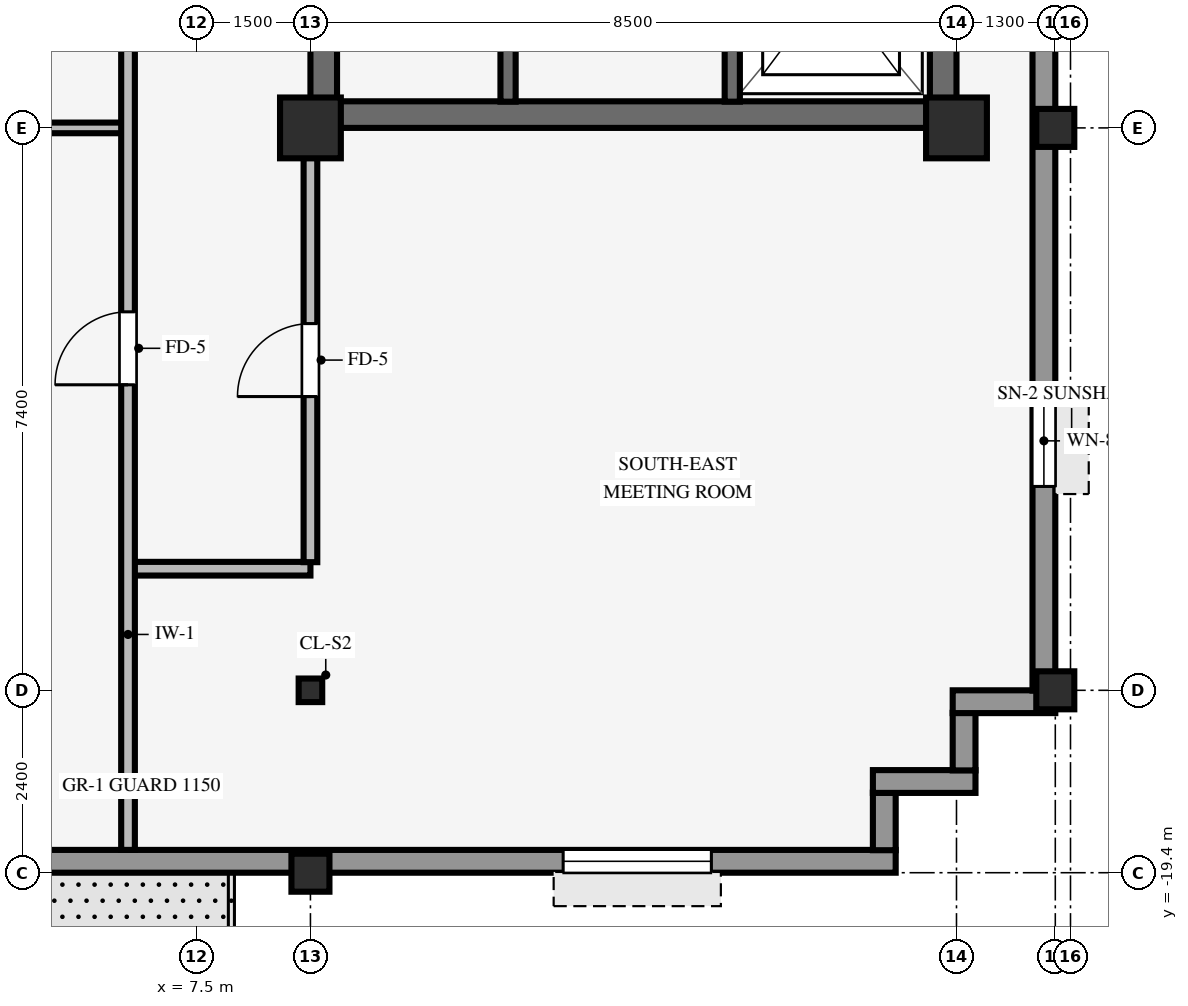
"""IFC4 building model, lengths in metres.
Left out: names, types, materials, properties, quantities, classifications, styles, units other than length and angle.
Written with IfcOpenShell. Run it as: python <this file> out.ifc"""

import sys

from ifc_helpers import new_model, si_unit, direction, frame, frame_2d, origin, origin_2d, place, context, subcontext, project, spatial, rectangle, hollow_rectangle, i_section, extrude, source, transform, mapped, element, fill, save


model = new_model("IFC4")
c1 = context("Model", 3, precision=1e-05, world=origin(), true_north=direction((0.0, 1.0)))
c2 = subcontext(c1, "Body", "Model", "MODEL_VIEW")
j1 = project(units=[si_unit("LENGTHUNIT", "METRE"), si_unit("PLANEANGLEUNIT", "RADIAN")], contexts=[c1])
p1 = place(None, origin())
s1 = spatial("IfcSite", under=j1, at=p1, CompositionType="ELEMENT")
p2 = place(p1, origin())
s2 = spatial("IfcBuilding", under=s1, at=p2, CompositionType="ELEMENT")
p3 = place(p2, frame((0.0, 0.0, 265.25)))
s3 = spatial("IfcBuildingStorey", under=s2, at=p3, CompositionType="ELEMENT", Elevation=265.25)
p4 = place(p3, frame((9.0, -9.425, 0.0), z_axis=(0.0, 0.0, 1.0), x_axis=(1.0, 0.0, 0.0)))
e1 = element("IfcWall", 1, at=p4, inside=s3, PredefinedType="SHEAR", context=c2, shape_type="SweptSolid", body=[
    extrude(rectangle(XDim=8.5, YDim=0.35, at=frame_2d((4.25, 0.0))), origin(), (0.0, 0.0, 1.0), 3.37),
])
p5 = place(p3, frame((9.175, -9.255, 0.0), z_axis=(0.0, 0.0, 1.0), x_axis=(0.0, 1.0, 0.0)))
e2 = element("IfcWall", 2, at=p5, inside=s3, PredefinedType="SHEAR", context=c2, shape_type="SweptSolid", body=[
    extrude(rectangle(XDim=18.51, YDim=0.35, at=frame_2d((9.255, 0.0))), origin(), (0.0, 0.0, 1.0), 3.37),
])
p6 = place(p5, frame((8.655, 0.0, 0.0)))
e3 = element("IfcOpeningElement", 3, at=p6, cuts=e2, PredefinedType="OPENING", context=c2, shape_type="SweptSolid", body=[
    extrude(rectangle(XDim=1.2, YDim=2.15, at=frame_2d((0.6, 1.075))), frame((0.0, 0.185, 0.0), z_axis=(0.0, -1.0, 0.0), x_axis=(1.0, 0.0, 0.0)), (0.0, 0.0, 1.0), 0.37),
])
p7 = place(p3, frame((17.325, -9.255, 0.0), z_axis=(0.0, 0.0, 1.0), x_axis=(0.0, 1.0, 0.0)))
e4 = element("IfcWall", 4, at=p7, inside=s3, PredefinedType="SHEAR", context=c2, shape_type="SweptSolid", body=[
    extrude(rectangle(XDim=18.51, YDim=0.35, at=frame_2d((9.255, 0.0))), origin(), (0.0, 0.0, 1.0), 3.37),
])
for number, where, z_axis, x_axis in (
    (5, (9.0, -9.6, 0.0), (0.0, 0.0, 1.0), (1.0, 0.0, 0.0)),
    (6, (17.5, -9.6, 0.0), (0.0, 0.0, 1.0), (1.0, 0.0, 0.0)),
):
    element("IfcColumn", number, at=place(p3, frame(where, z_axis=z_axis, x_axis=x_axis)), inside=s3, PredefinedType="COLUMN", context=c2, shape_type="SweptSolid", body=[
        extrude(rectangle(XDim=0.8, YDim=0.8, at=origin_2d()), origin(), (0.0, 0.0, 1.0), 3.37),
    ])
for number, where, z_axis, x_axis in (
    (7, (18.8, -17.0, 0.0), (0.0, 0.0, 1.0), (1.0, 0.0, 0.0)),
    (8, (18.8, -9.6, 0.0), (0.0, 0.0, 1.0), (1.0, 0.0, 0.0)),
    (9, (9.0, -19.4, 0.0), (0.0, 0.0, 1.0), (1.0, 0.0, 0.0)),
):
    element("IfcColumn", number, at=place(p3, frame(where, z_axis=z_axis, x_axis=x_axis)), inside=s3, PredefinedType="COLUMN", context=c2, shape_type="SweptSolid", body=[
        extrude(hollow_rectangle(XDim=0.5, YDim=0.5, WallThickness=0.032, InnerFilletRadius=0.032, OuterFilletRadius=0.064, at=origin_2d()), origin(), (0.0, 0.0, 1.0), 3.37),
    ])
p8 = place(p3, frame((9.0, -17.0, 0.0), z_axis=(0.0, 0.0, 1.0), x_axis=(1.0, 0.0, 0.0)))
e10 = element("IfcColumn", 10, at=p8, inside=s3, PredefinedType="COLUMN", context=c2, shape_type="SweptSolid", body=[
    extrude(i_section(OverallWidth=0.31, OverallDepth=0.31, WebThickness=0.015, FlangeThickness=0.015, FilletRadius=0.015, at=origin_2d()), origin(), (0.0, 0.0, 1.0), 3.37),
])
p9 = place(p3, frame((-18.9, -19.25, 0.0), z_axis=(0.0, 0.0, 1.0), x_axis=(1.0, 0.0, 0.0)))
e11 = element("IfcWall", 11, at=p9, inside=s3, PredefinedType="STANDARD", context=c2, shape_type="SweptSolid", body=[
    extrude(rectangle(XDim=35.6, YDim=0.3, at=frame_2d((17.8, 0.0))), origin(), (0.0, 0.0, 1.0), 2.705),
])
p10 = place(p9, frame((24.15, 0.0, 0.0), z_axis=(0.0, 0.0, 1.0), x_axis=(-1.0, 0.0, 0.0)))
e12 = element("IfcOpeningElement", 12, at=p10, cuts=e11, PredefinedType="OPENING", context=c2, shape_type="SweptSolid", body=[
    extrude(rectangle(XDim=1.05, YDim=2.1, at=frame_2d((0.525, 1.05))), frame((0.0, 0.16, 0.0), z_axis=(0.0, -1.0, 0.0), x_axis=(1.0, 0.0, 0.0)), (0.0, 0.0, 1.0), 0.32),
])
p11 = place(p9, frame((2.425, 0.0, 0.8)))
e13 = element("IfcOpeningElement", 13, at=p11, cuts=e11, PredefinedType="OPENING", context=c2, shape_type="SweptSolid", body=[
    extrude(rectangle(XDim=1.95, YDim=1.48, at=frame_2d((0.975, 0.74))), frame((0.0, 0.16, 0.0), z_axis=(0.0, -1.0, 0.0), x_axis=(1.0, 0.0, 0.0)), (0.0, 0.0, 1.0), 0.32),
])
p12 = place(p9, frame((7.225, 0.0, 0.8)))
e14 = element("IfcOpeningElement", 14, at=p12, cuts=e11, PredefinedType="OPENING", context=c2, shape_type="SweptSolid", body=[
    extrude(rectangle(XDim=1.95, YDim=1.48, at=frame_2d((0.975, 0.74))), frame((0.0, 0.16, 0.0), z_axis=(0.0, -1.0, 0.0), x_axis=(1.0, 0.0, 0.0)), (0.0, 0.0, 1.0), 0.32),
])
p13 = place(p9, frame((12.925, 0.0, 0.8)))
e15 = element("IfcOpeningElement", 15, at=p13, cuts=e11, PredefinedType="OPENING", context=c2, shape_type="SweptSolid", body=[
    extrude(rectangle(XDim=1.95, YDim=1.48, at=frame_2d((0.975, 0.74))), frame((0.0, 0.16, 0.0), z_axis=(0.0, -1.0, 0.0), x_axis=(1.0, 0.0, 0.0)), (0.0, 0.0, 1.0), 0.32),
])
p14 = place(p9, frame((15.475, 0.0, 0.8)))
e16 = element("IfcOpeningElement", 16, at=p14, cuts=e11, PredefinedType="OPENING", context=c2, shape_type="SweptSolid", body=[
    extrude(rectangle(XDim=1.95, YDim=1.48, at=frame_2d((0.975, 0.74))), frame((0.0, 0.16, 0.0), z_axis=(0.0, -1.0, 0.0), x_axis=(1.0, 0.0, 0.0)), (0.0, 0.0, 1.0), 0.32),
])
p15 = place(p9, frame((20.725, 0.0, 0.8)))
e17 = element("IfcOpeningElement", 17, at=p15, cuts=e11, PredefinedType="OPENING", context=c2, shape_type="SweptSolid", body=[
    extrude(rectangle(XDim=1.95, YDim=1.48, at=frame_2d((0.975, 0.74))), frame((0.0, 0.16, 0.0), z_axis=(0.0, -1.0, 0.0), x_axis=(1.0, 0.0, 0.0)), (0.0, 0.0, 1.0), 0.32),
])
p16 = place(p9, frame((31.225, 0.0, 0.8)))
e18 = element("IfcOpeningElement", 18, at=p16, cuts=e11, PredefinedType="OPENING", context=c2, shape_type="SweptSolid", body=[
    extrude(rectangle(XDim=1.95, YDim=1.48, at=frame_2d((0.975, 0.74))), frame((0.0, 0.16, 0.0), z_axis=(0.0, -1.0, 0.0), x_axis=(1.0, 0.0, 0.0)), (0.0, 0.0, 1.0), 0.32),
])
p17 = place(p3, frame((16.55, -19.104, 0.0), z_axis=(0.0, 0.0, 1.0), x_axis=(0.0, 1.0, 0.0)))
e19 = element("IfcWall", 19, at=p17, inside=s3, PredefinedType="STANDARD", context=c2, shape_type="SweptSolid", body=[
    extrude(rectangle(XDim=0.758, YDim=0.3, at=frame_2d((0.379, 0.0))), origin(), (0.0, 0.0, 1.0), 2.892),
])
p18 = place(p3, frame((16.4, -18.2, 0.0), z_axis=(0.0, 0.0, 1.0), x_axis=(1.0, 0.0, 0.0)))
e20 = element("IfcWall", 20, at=p18, inside=s3, PredefinedType="STANDARD", context=c2, shape_type="SweptSolid", body=[
    extrude(rectangle(XDim=1.35, YDim=0.3, at=frame_2d((0.675, 0.0))), origin(), (0.0, 0.0, 1.0), 2.892),
])
p19 = place(p3, frame((17.6, -18.054, 0.0), z_axis=(0.0, 0.0, 1.0), x_axis=(0.0, 1.0, 0.0)))
e21 = element("IfcWall", 21, at=p19, inside=s3, PredefinedType="STANDARD", context=c2, shape_type="SweptSolid", body=[
    extrude(rectangle(XDim=0.758, YDim=0.3, at=frame_2d((0.379, 0.0))), origin(), (0.0, 0.0, 1.0), 2.892),
])
p20 = place(p3, frame((17.45, -17.15, 0.0), z_axis=(0.0, 0.0, 1.0), x_axis=(1.0, 0.0, 0.0)))
e22 = element("IfcWall", 22, at=p20, inside=s3, PredefinedType="STANDARD", context=c2, shape_type="SweptSolid", body=[
    extrude(rectangle(XDim=1.35, YDim=0.3, at=frame_2d((0.675, 0.0))), origin(), (0.0, 0.0, 1.0), 2.892),
])
p21 = place(p3, frame((18.65, -17.004, 0.0), z_axis=(0.0, 0.0, 1.0), x_axis=(0.0, 1.0, 0.0)))
e23 = element("IfcWall", 23, at=p21, inside=s3, PredefinedType="STANDARD", context=c2, shape_type="SweptSolid", body=[
    extrude(rectangle(XDim=34.008, YDim=0.3, at=frame_2d((17.004, 0.0))), origin(), (0.0, 0.0, 1.0), 2.705),
])
p22 = place(p21, frame((2.686, 0.0, 0.8)))
e24 = element("IfcOpeningElement", 24, at=p22, cuts=e23, PredefinedType="OPENING", context=c2, shape_type="SweptSolid", body=[
    extrude(rectangle(XDim=1.2, YDim=1.48, at=frame_2d((0.6, 0.74))), frame((0.0, 0.16, 0.0), z_axis=(0.0, -1.0, 0.0), x_axis=(1.0, 0.0, 0.0)), (0.0, 0.0, 1.0), 0.32),
])
p23 = place(p21, frame((30.122, 0.0, 0.8)))
e25 = element("IfcOpeningElement", 25, at=p23, cuts=e23, PredefinedType="OPENING", context=c2, shape_type="SweptSolid", body=[
    extrude(rectangle(XDim=1.2, YDim=1.48, at=frame_2d((0.6, 0.74))), frame((0.0, 0.16, 0.0), z_axis=(0.0, -1.0, 0.0), x_axis=(1.0, 0.0, 0.0)), (0.0, 0.0, 1.0), 0.32),
])
p24 = place(p3, frame((14.55, -9.255, 0.0), z_axis=(0.0, 0.0, 1.0), x_axis=(0.0, 1.0, 0.0)))
e26 = element("IfcWall", 26, at=p24, inside=s3, PredefinedType="SHEAR", context=c2, shape_type="SweptSolid", body=[
    extrude(rectangle(XDim=10.16, YDim=0.2, at=frame_2d((5.08, 0.0))), origin(), (0.0, 0.0, 1.0), 3.37),
])
p25 = place(p24, frame((6.615, 0.0, 0.0)))
e27 = element("IfcOpeningElement", 27, at=p25, cuts=e26, PredefinedType="OPENING", context=c2, shape_type="SweptSolid", body=[
    extrude(rectangle(XDim=0.88, YDim=2.1, at=frame_2d((0.44, 1.05))), frame((0.0, 0.11, 0.0), z_axis=(0.0, -1.0, 0.0), x_axis=(1.0, 0.0, 0.0)), (0.0, 0.0, 1.0), 0.22),
])
p26 = place(p24, frame((0.98, 0.0, 0.0)))
e28 = element("IfcOpeningElement", 28, at=p26, cuts=e26, PredefinedType="OPENING", context=c2, shape_type="SweptSolid", body=[
    extrude(rectangle(XDim=1.15, YDim=2.15, at=frame_2d((0.575, 1.075))), frame((0.0, 0.11, 0.0), z_axis=(0.0, -1.0, 0.0), x_axis=(1.0, 0.0, 0.0)), (0.0, 0.0, 1.0), 0.22),
])
p27 = place(p3, frame((11.6, -9.255, 0.0), z_axis=(0.0, 0.0, 1.0), x_axis=(0.0, 1.0, 0.0)))
e29 = element("IfcWall", 29, at=p27, inside=s3, PredefinedType="SHEAR", context=c2, shape_type="SweptSolid", body=[
    extrude(rectangle(XDim=8.025, YDim=0.2, at=frame_2d((4.012, 0.0))), origin(), (0.0, 0.0, 1.0), 3.37),
])
p28 = place(p27, frame((5.615, 0.0, 0.0)))
e30 = element("IfcOpeningElement", 30, at=p28, cuts=e29, PredefinedType="OPENING", context=c2, shape_type="SweptSolid", body=[
    extrude(rectangle(XDim=0.88, YDim=2.1, at=frame_2d((0.44, 1.05))), frame((0.0, 0.11, 0.0), z_axis=(0.0, -1.0, 0.0), x_axis=(1.0, 0.0, 0.0)), (0.0, 0.0, 1.0), 0.22),
])
p29 = place(p3, frame((6.666, -15.4, 0.0), z_axis=(0.0, 0.0, 1.0), x_axis=(1.0, 0.0, 0.0)))
e31 = element("IfcWall", 31, at=p29, inside=s3, PredefinedType="PARTITIONING", context=c2, shape_type="SweptSolid", body=[
    extrude(rectangle(XDim=2.334, YDim=0.18, at=frame_2d((1.167, 0.0))), origin(), (0.0, 0.0, 1.0), 3.36),
])
p30 = place(p3, frame((0.151, -9.6, 0.0), z_axis=(0.0, 0.0, 1.0), x_axis=(1.0, 0.0, 0.0)))
e32 = element("IfcWall", 32, at=p30, inside=s3, PredefinedType="PARTITIONING", context=c2, shape_type="SweptSolid", body=[
    extrude(rectangle(XDim=6.383, YDim=0.14, at=frame_2d((3.191, 0.0))), origin(), (0.0, 0.0, 1.0), 2.405),
])
p31 = place(p3, frame((6.6, -19.1, 0.0), z_axis=(0.0, 0.0, 1.0), x_axis=(0.0, 1.0, 0.0)))
e33 = element("IfcWall", 33, at=p31, inside=s3, PredefinedType="PARTITIONING", context=c2, shape_type="SweptSolid", body=[
    extrude(rectangle(XDim=17.764, YDim=0.18, at=frame_2d((8.882, 0.0))), origin(), (0.0, 0.0, 1.0), 3.36),
])
p32 = place(p31, frame((13.152, 0.0, 0.0)))
e34 = element("IfcOpeningElement", 34, at=p32, cuts=e33, PredefinedType="OPENING", context=c2, shape_type="SweptSolid", body=[
    extrude(rectangle(XDim=0.96, YDim=2.1, at=frame_2d((0.48, 1.05))), frame((0.0, 0.1, 0.0), z_axis=(0.0, -1.0, 0.0), x_axis=(1.0, 0.0, 0.0)), (0.0, 0.0, 1.0), 0.2),
])
p33 = place(p31, frame((6.12, 0.0, 0.0)))
e35 = element("IfcOpeningElement", 35, at=p33, cuts=e33, PredefinedType="OPENING", context=c2, shape_type="SweptSolid", body=[
    extrude(rectangle(XDim=0.96, YDim=2.1, at=frame_2d((0.48, 1.05))), frame((0.0, 0.1, 0.0), z_axis=(0.0, -1.0, 0.0), x_axis=(1.0, 0.0, 0.0)), (0.0, 0.0, 1.0), 0.2),
])
p34 = place(p3, frame((9.0, -15.314, 0.0), z_axis=(0.0, 0.0, 1.0), x_axis=(0.0, 1.0, 0.0)))
e36 = element("IfcWall", 36, at=p34, inside=s3, PredefinedType="PARTITIONING", context=c2, shape_type="SweptSolid", body=[
    extrude(rectangle(XDim=5.318, YDim=0.18, at=frame_2d((2.659, 0.0))), origin(), (0.0, 0.0, 1.0), 2.892),
])
p35 = place(p34, frame((2.179, 0.0, 0.0)))
e37 = element("IfcOpeningElement", 37, at=p35, cuts=e36, PredefinedType="OPENING", context=c2, shape_type="SweptSolid", body=[
    extrude(rectangle(XDim=0.96, YDim=2.1, at=frame_2d((0.48, 1.05))), frame((0.0, 0.1, 0.0), z_axis=(0.0, -1.0, 0.0), x_axis=(1.0, 0.0, 0.0)), (0.0, 0.0, 1.0), 0.2),
])
m1 = source(origin(), c2, "Body", "SweptSolid", [
    extrude(rectangle(XDim=1.95, YDim=1.48, at=frame_2d((0.975, 0.74))), frame((0.0, 0.03, 0.0), z_axis=(0.0, -1.0, 0.0), x_axis=(1.0, 0.0, 0.0)), (0.0, 0.0, 1.0), 0.06),
])
p36 = place(p16, origin())
e38 = element("IfcWindow", 38, at=p36, inside=s3, PartitioningType="SINGLE_PANEL", PredefinedType="WINDOW", context=c2, shape_type="MappedRepresentation", body=[
    mapped(m1, transform((0.0, 0.0, 0.0), scale=1.0)),
])
fill(e18, e38)
m2 = source(origin(), c2, "Body", "SweptSolid", [
    extrude(rectangle(XDim=1.2, YDim=1.48, at=frame_2d((0.6, 0.74))), frame((0.0, 0.03, 0.0), z_axis=(0.0, -1.0, 0.0), x_axis=(1.0, 0.0, 0.0)), (0.0, 0.0, 1.0), 0.06),
])
p37 = place(p22, origin())
e39 = element("IfcWindow", 39, at=p37, inside=s3, PartitioningType="SINGLE_PANEL", PredefinedType="WINDOW", context=c2, shape_type="MappedRepresentation", body=[
    mapped(m2, transform((0.0, 0.0, 0.0), scale=1.0)),
])
fill(e24, e39)
m3 = source(origin(), c2, "Body", "SweptSolid", [
    extrude(rectangle(XDim=0.96, YDim=2.1, at=frame_2d((0.48, 1.05))), frame((0.0, 0.025, 0.0), z_axis=(0.0, -1.0, 0.0), x_axis=(1.0, 0.0, 0.0)), (0.0, 0.0, 1.0), 0.05),
])
p38 = place(p33, origin())
e40 = element("IfcDoor", 40, at=p38, inside=s3, OperationType="SINGLE_SWING_LEFT", PredefinedType="DOOR", context=c2, shape_type="MappedRepresentation", body=[
    mapped(m3, transform((0.0, 0.0, 0.0), scale=1.0)),
])
fill(e35, e40)
p39 = place(p35, origin())
e41 = element("IfcDoor", 41, at=p39, inside=s3, OperationType="SINGLE_SWING_LEFT", PredefinedType="DOOR", context=c2, shape_type="MappedRepresentation", body=[
    mapped(m3, transform((0.0, 0.0, 0.0), scale=1.0)),
])
fill(e37, e41)
save(model, sys.argv[1])
